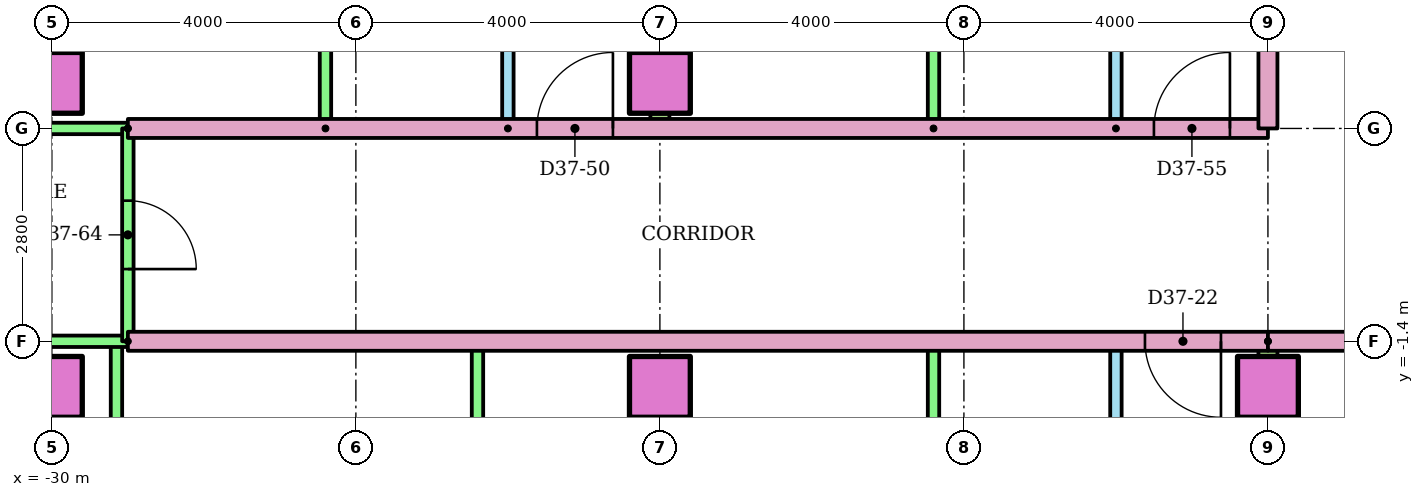
"""IFC4 building model, lengths in metres.
Left out: names, types, materials, properties, quantities, classifications, styles, units other than length and angle.
Written with IfcOpenShell. Run it as: python <this file> out.ifc"""

import sys

from ifc_helpers import new_model, si_unit, direction, frame, frame_2d, origin, origin_2d, place, context, subcontext, project, spatial, rectangle, extrude, element, fill, save


model = new_model("IFC4")
c1 = context("Model", 3, precision=1e-05, world=origin(), true_north=direction((0.0, 1.0)))
c2 = subcontext(c1, "Body", "Model", "MODEL_VIEW")
j1 = project(units=[si_unit("LENGTHUNIT", "METRE"), si_unit("PLANEANGLEUNIT", "RADIAN")], contexts=[c1])
p1 = place(None, origin())
s1 = spatial("IfcSite", under=j1, at=p1, CompositionType="ELEMENT")
p2 = place(p1, origin())
s2 = spatial("IfcBuilding", under=s1, at=p2, CompositionType="ELEMENT")
p3 = place(p2, frame((0.0, 0.0, 142.2)))
s3 = spatial("IfcBuildingStorey", under=s2, at=p3, CompositionType="ELEMENT", Elevation=142.2)
for number, where in (
    (1, (-30.0, -2.0, 0.0)),
    (2, (-22.0, -2.0, 0.0)),
    (3, (-14.0, -2.0, 0.0)),
    (4, (-30.0, 2.0, 0.0)),
    (5, (-22.0, 2.0, 0.0)),
):
    element("IfcColumn", number, at=place(p3, frame(where)), inside=s3, PredefinedType="COLUMN", context=c2, shape_type="SweptSolid", body=[
        extrude(rectangle(XDim=0.8, YDim=0.8, at=origin_2d()), origin(), (0.0, 0.0, 1.0), 3.2),
    ])
p4 = place(p3, frame((-16.0, -6.8, 0.0), z_axis=(0.0, 0.0, 1.0), x_axis=(0.0, 1.0, 0.0)))
e6 = element("IfcWall", 6, at=p4, inside=s3, PredefinedType="PARTITIONING", context=c2, shape_type="SweptSolid", body=[
    extrude(rectangle(XDim=5.4, YDim=0.15, at=frame_2d((2.7, 0.0))), origin(), (0.0, 0.0, 1.0), 2.4),
])
p5 = place(p4, frame((3.45, 0.0, 0.0)))
e7 = element("IfcOpeningElement", 7, at=p5, cuts=e6, PredefinedType="OPENING", context=c2, shape_type="SweptSolid", body=[
    extrude(rectangle(XDim=0.9, YDim=2.1, at=frame_2d((0.45, 1.05))), frame((0.0, 0.085, 0.0), z_axis=(0.0, -1.0, 0.0), x_axis=(1.0, 0.0, 0.0)), (0.0, 0.0, 1.0), 0.17),
])
p6 = place(p4, frame((0.8, 0.0, 0.0)))
e8 = element("IfcOpeningElement", 8, at=p6, cuts=e6, PredefinedType="OPENING", context=c2, shape_type="SweptSolid", body=[
    extrude(rectangle(XDim=0.8, YDim=2.1, at=frame_2d((0.4, 1.05))), frame((0.0, 0.085, 0.0), z_axis=(0.0, -1.0, 0.0), x_axis=(1.0, 0.0, 0.0)), (0.0, 0.0, 1.0), 0.17),
])
for number, where, z_axis, x_axis in (
    (9, (-18.4, -6.8, 0.0), (0.0, 0.0, 1.0), (0.0, 1.0, 0.0)),
    (10, (-24.4, -6.8, 0.0), (0.0, 0.0, 1.0), (0.0, 1.0, 0.0)),
    (11, (-29.15, -6.8, 0.0), (0.0, 0.0, 1.0), (0.0, 1.0, 0.0)),
):
    element("IfcWall", number, at=place(p3, frame(where, z_axis=z_axis, x_axis=x_axis)), inside=s3, PredefinedType="PARTITIONING", context=c2, shape_type="SweptSolid", body=[
        extrude(rectangle(XDim=5.4, YDim=0.15, at=frame_2d((2.7, 0.0))), origin(), (0.0, 0.0, 1.0), 2.4),
    ])
p7 = place(p3, frame((-14.0, -1.4, 0.0), z_axis=(0.0, 0.0, 1.0), x_axis=(0.0, -1.0, 0.0)))
e12 = element("IfcWall", 12, at=p7, inside=s3, PredefinedType="PARTITIONING", context=c2, shape_type="SweptSolid", body=[
    extrude(rectangle(XDim=14.91, YDim=0.25, at=frame_2d((7.455, 0.0))), origin(), (0.0, 0.0, 1.0), 2.4),
])
p8 = place(p3, frame((-14.0, -1.4, 0.0), z_axis=(0.0, 0.0, 1.0), x_axis=(-1.0, 0.0, 0.0)))
e13 = element("IfcWall", 13, at=p8, inside=s3, PredefinedType="PARTITIONING", context=c2, shape_type="SweptSolid", body=[
    extrude(rectangle(XDim=15.0, YDim=0.25, at=frame_2d((7.5, 0.0))), origin(), (0.0, 0.0, 1.0), 2.4),
])
p9 = place(p8, frame((0.618, 0.0, 0.0)))
e14 = element("IfcOpeningElement", 14, at=p9, cuts=e13, PredefinedType="OPENING", context=c2, shape_type="SweptSolid", body=[
    extrude(rectangle(XDim=1.0, YDim=2.1, at=frame_2d((0.5, 1.05))), frame((0.0, 0.135, 0.0), z_axis=(0.0, -1.0, 0.0), x_axis=(1.0, 0.0, 0.0)), (0.0, 0.0, 1.0), 0.27),
])
p10 = place(p3, frame((-29.0, -1.4, 0.0), z_axis=(0.0, 0.0, 1.0), x_axis=(-1.0, 0.0, 0.0)))
e15 = element("IfcWall", 15, at=p10, inside=s3, PredefinedType="PARTITIONING", context=c2, shape_type="SweptSolid", body=[
    extrude(rectangle(XDim=3.72, YDim=0.15, at=frame_2d((1.86, 0.0))), origin(), (0.0, 0.0, 1.0), 2.4),
])
p11 = place(p3, frame((-24.0, 1.4, 0.0), z_axis=(0.0, 0.0, 1.0), x_axis=(0.0, 1.0, 0.0)))
e16 = element("IfcWall", 16, at=p11, inside=s3, PredefinedType="PARTITIONING", context=c2, shape_type="SweptSolid", body=[
    extrude(rectangle(XDim=7.8, YDim=0.15, at=frame_2d((3.9, 0.0))), origin(), (0.0, 0.0, 1.0), 2.4),
])
p12 = place(p11, frame((1.675, 0.0, 0.0)))
e17 = element("IfcOpeningElement", 17, at=p12, cuts=e16, PredefinedType="OPENING", context=c2, shape_type="SweptSolid", body=[
    extrude(rectangle(XDim=0.9, YDim=2.1, at=frame_2d((0.45, 1.05))), frame((0.0, 0.085, 0.0), z_axis=(0.0, -1.0, 0.0), x_axis=(1.0, 0.0, 0.0)), (0.0, 0.0, 1.0), 0.17),
])
p13 = place(p11, frame((5.625, 0.0, 0.0)))
e18 = element("IfcOpeningElement", 18, at=p13, cuts=e16, PredefinedType="OPENING", context=c2, shape_type="SweptSolid", body=[
    extrude(rectangle(XDim=0.8, YDim=2.1, at=frame_2d((0.4, 1.05))), frame((0.0, 0.085, 0.0), z_axis=(0.0, -1.0, 0.0), x_axis=(1.0, 0.0, 0.0)), (0.0, 0.0, 1.0), 0.17),
])
p14 = place(p3, frame((-26.4, 1.4, 0.0), z_axis=(0.0, 0.0, 1.0), x_axis=(0.0, 1.0, 0.0)))
e19 = element("IfcWall", 19, at=p14, inside=s3, PredefinedType="PARTITIONING", context=c2, shape_type="SweptSolid", body=[
    extrude(rectangle(XDim=7.8, YDim=0.15, at=frame_2d((3.9, 0.0))), origin(), (0.0, 0.0, 1.0), 2.4),
])
p15 = place(p3, frame((-16.0, 1.4, 0.0), z_axis=(0.0, 0.0, 1.0), x_axis=(0.0, 1.0, 0.0)))
e20 = element("IfcWall", 20, at=p15, inside=s3, PredefinedType="PARTITIONING", context=c2, shape_type="SweptSolid", body=[
    extrude(rectangle(XDim=7.8, YDim=0.15, at=frame_2d((3.9, 0.0))), origin(), (0.0, 0.0, 1.0), 2.4),
])
p16 = place(p15, frame((1.675, 0.0, 0.0)))
e21 = element("IfcOpeningElement", 21, at=p16, cuts=e20, PredefinedType="OPENING", context=c2, shape_type="SweptSolid", body=[
    extrude(rectangle(XDim=0.9, YDim=2.1, at=frame_2d((0.45, 1.05))), frame((0.0, 0.085, 0.0), z_axis=(0.0, -1.0, 0.0), x_axis=(1.0, 0.0, 0.0)), (0.0, 0.0, 1.0), 0.17),
])
p17 = place(p15, frame((5.625, 0.0, 0.0)))
e22 = element("IfcOpeningElement", 22, at=p17, cuts=e20, PredefinedType="OPENING", context=c2, shape_type="SweptSolid", body=[
    extrude(rectangle(XDim=0.8, YDim=2.1, at=frame_2d((0.4, 1.05))), frame((0.0, 0.085, 0.0), z_axis=(0.0, -1.0, 0.0), x_axis=(1.0, 0.0, 0.0)), (0.0, 0.0, 1.0), 0.17),
])
p18 = place(p3, frame((-18.4, 1.4, 0.0), z_axis=(0.0, 0.0, 1.0), x_axis=(0.0, 1.0, 0.0)))
e23 = element("IfcWall", 23, at=p18, inside=s3, PredefinedType="PARTITIONING", context=c2, shape_type="SweptSolid", body=[
    extrude(rectangle(XDim=7.8, YDim=0.15, at=frame_2d((3.9, 0.0))), origin(), (0.0, 0.0, 1.0), 2.4),
])
p19 = place(p3, frame((-22.0, 18.721, 0.0), z_axis=(0.0, 0.0, 1.0), x_axis=(0.0, -1.0, 0.0)))
e24 = element("IfcWall", 24, at=p19, inside=s3, PredefinedType="PARTITIONING", context=c2, shape_type="SweptSolid", body=[
    extrude(rectangle(XDim=17.321, YDim=0.25, at=frame_2d((8.661, 0.0))), origin(), (0.0, 0.0, 1.0), 2.4),
])
p20 = place(p3, frame((-29.0, 1.4, 0.0)))
e25 = element("IfcWall", 25, at=p20, inside=s3, PredefinedType="PARTITIONING", context=c2, shape_type="SweptSolid", body=[
    extrude(rectangle(XDim=15.0, YDim=0.25, at=frame_2d((7.5, 0.0))), origin(), (0.0, 0.0, 1.0), 2.4),
])
p21 = place(p20, frame((5.382, 0.0, 0.0)))
e26 = element("IfcOpeningElement", 26, at=p21, cuts=e25, PredefinedType="OPENING", context=c2, shape_type="SweptSolid", body=[
    extrude(rectangle(XDim=1.0, YDim=2.1, at=frame_2d((0.5, 1.05))), frame((0.0, 0.135, 0.0), z_axis=(0.0, -1.0, 0.0), x_axis=(1.0, 0.0, 0.0)), (0.0, 0.0, 1.0), 0.27),
])
p22 = place(p20, frame((13.5, 0.0, 0.0)))
e27 = element("IfcOpeningElement", 27, at=p22, cuts=e25, PredefinedType="OPENING", context=c2, shape_type="SweptSolid", body=[
    extrude(rectangle(XDim=1.0, YDim=2.1, at=frame_2d((0.5, 1.05))), frame((0.0, 0.135, 0.0), z_axis=(0.0, -1.0, 0.0), x_axis=(1.0, 0.0, 0.0)), (0.0, 0.0, 1.0), 0.27),
])
p23 = place(p3, frame((-32.72, 1.4, 0.0)))
e28 = element("IfcWall", 28, at=p23, inside=s3, PredefinedType="PARTITIONING", context=c2, shape_type="SweptSolid", body=[
    extrude(rectangle(XDim=3.72, YDim=0.15, at=frame_2d((1.86, 0.0))), origin(), (0.0, 0.0, 1.0), 2.4),
])
p24 = place(p3, frame((-29.0, 1.4, 0.0), z_axis=(0.0, 0.0, 1.0), x_axis=(0.0, -1.0, 0.0)))
e29 = element("IfcWall", 29, at=p24, inside=s3, PredefinedType="PARTITIONING", context=c2, shape_type="SweptSolid", body=[
    extrude(rectangle(XDim=2.8, YDim=0.15, at=frame_2d((1.4, 0.0))), origin(), (0.0, 0.0, 1.0), 2.4),
])
p25 = place(p24, frame((0.95, 0.0, 0.0)))
e30 = element("IfcOpeningElement", 30, at=p25, cuts=e29, PredefinedType="OPENING", context=c2, shape_type="SweptSolid", body=[
    extrude(rectangle(XDim=0.9, YDim=2.1, at=frame_2d((0.45, 1.05))), frame((0.0, 0.085, 0.0), z_axis=(0.0, -1.0, 0.0), x_axis=(1.0, 0.0, 0.0)), (0.0, 0.0, 1.0), 0.17),
])
p26 = place(p3, frame((14.0, -1.4, 0.0), z_axis=(0.0, 0.0, 1.0), x_axis=(-1.0, 0.0, 0.0)))
e31 = element("IfcWall", 31, at=p26, inside=s3, PredefinedType="PARTITIONING", context=c2, shape_type="SweptSolid", body=[
    extrude(rectangle(XDim=28.0, YDim=0.25, at=frame_2d((14.0, 0.0))), origin(), (0.0, 0.0, 1.0), 2.4),
])
p27 = place(p26, frame((4.618, 0.0, 0.0)))
e32 = element("IfcOpeningElement", 32, at=p27, cuts=e31, PredefinedType="OPENING", context=c2, shape_type="SweptSolid", body=[
    extrude(rectangle(XDim=1.0, YDim=2.1, at=frame_2d((0.5, 1.05))), frame((0.0, 0.135, 0.0), z_axis=(0.0, -1.0, 0.0), x_axis=(1.0, 0.0, 0.0)), (0.0, 0.0, 1.0), 0.27),
])
p28 = place(p26, frame((2.382, 0.0, 0.0)))
e33 = element("IfcOpeningElement", 33, at=p28, cuts=e31, PredefinedType="OPENING", context=c2, shape_type="SweptSolid", body=[
    extrude(rectangle(XDim=1.0, YDim=2.1, at=frame_2d((0.5, 1.05))), frame((0.0, 0.135, 0.0), z_axis=(0.0, -1.0, 0.0), x_axis=(1.0, 0.0, 0.0)), (0.0, 0.0, 1.0), 0.27),
])
p29 = place(p3, frame((-14.0, 3.0, 0.0), z_axis=(0.0, 0.0, 1.0), x_axis=(0.0, -1.0, 0.0)))
e34 = element("IfcWall", 34, at=p29, inside=s3, PredefinedType="PARTITIONING", context=c2, shape_type="SweptSolid", body=[
    extrude(rectangle(XDim=1.6, YDim=0.25, at=frame_2d((0.8, 0.0))), origin(), (0.0, 0.0, 1.0), 2.4),
])
p30 = place(p9, origin())
e35 = element("IfcDoor", 35, at=p30, inside=s3, OperationType="SINGLE_SWING_LEFT", PredefinedType="DOOR", context=c2, shape_type="SweptSolid", body=[
    extrude(rectangle(XDim=1.0, YDim=2.1, at=frame_2d((0.5, 1.05))), frame((0.0, 0.025, 0.0), z_axis=(0.0, -1.0, 0.0), x_axis=(1.0, 0.0, 0.0)), (0.0, 0.0, 1.0), 0.05),
])
fill(e14, e35)
p31 = place(p21, origin())
e36 = element("IfcDoor", 36, at=p31, inside=s3, OperationType="SINGLE_SWING_RIGHT", PredefinedType="DOOR", context=c2, shape_type="SweptSolid", body=[
    extrude(rectangle(XDim=1.0, YDim=2.1, at=frame_2d((0.5, 1.05))), frame((0.0, 0.025, 0.0), z_axis=(0.0, -1.0, 0.0), x_axis=(1.0, 0.0, 0.0)), (0.0, 0.0, 1.0), 0.05),
])
fill(e26, e36)
p32 = place(p22, origin())
e37 = element("IfcDoor", 37, at=p32, inside=s3, OperationType="SINGLE_SWING_RIGHT", PredefinedType="DOOR", context=c2, shape_type="SweptSolid", body=[
    extrude(rectangle(XDim=1.0, YDim=2.1, at=frame_2d((0.5, 1.05))), frame((0.0, 0.025, 0.0), z_axis=(0.0, -1.0, 0.0), x_axis=(1.0, 0.0, 0.0)), (0.0, 0.0, 1.0), 0.05),
])
fill(e27, e37)
p33 = place(p25, origin())
e38 = element("IfcDoor", 38, at=p33, inside=s3, OperationType="SINGLE_SWING_RIGHT", PredefinedType="DOOR", context=c2, shape_type="SweptSolid", body=[
    extrude(rectangle(XDim=0.9, YDim=2.1, at=frame_2d((0.45, 1.05))), frame((0.0, 0.025, 0.0), z_axis=(0.0, -1.0, 0.0), x_axis=(1.0, 0.0, 0.0)), (0.0, 0.0, 1.0), 0.05),
])
fill(e30, e38)
save(model, sys.argv[1])
